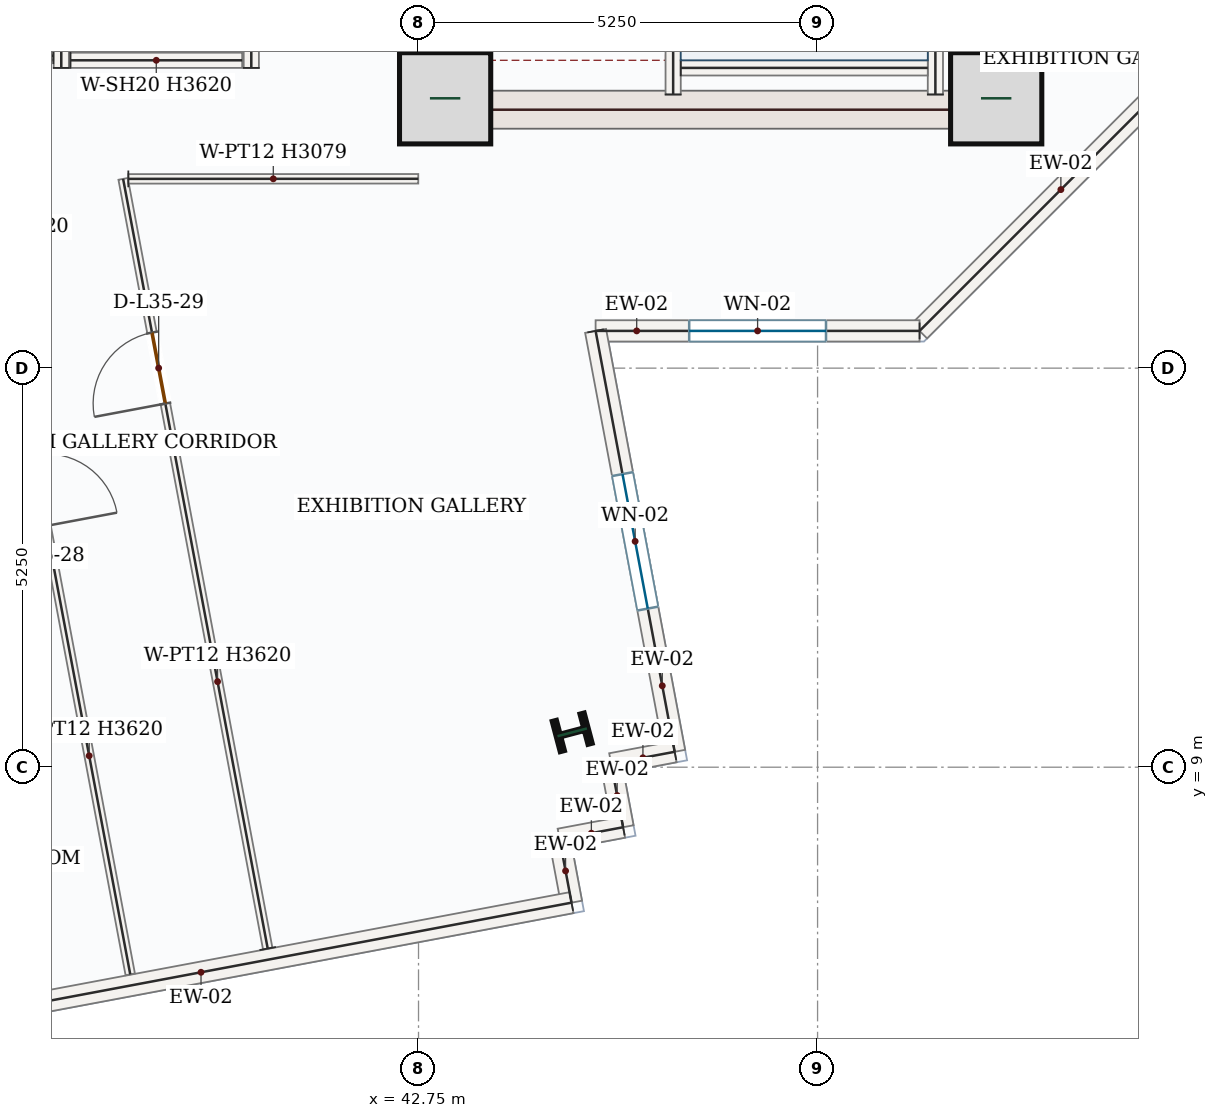
"""IFC4 building model, lengths in metres.
Left out: names, types, materials, properties, quantities, classifications, styles, units other than length and angle.
Written with IfcOpenShell. Run it as: python <this file> out.ifc"""

import sys

from ifc_helpers import new_model, si_unit, direction, frame, frame_2d, origin, origin_2d, place, context, subcontext, project, spatial, rectangle, i_section, extrude, source, transform, mapped, element, fill, save


model = new_model("IFC4")
c1 = context("Model", 3, precision=1e-05, world=origin(), true_north=direction((0.0, 1.0)))
c2 = subcontext(c1, "Body", "Model", "MODEL_VIEW")
j1 = project(units=[si_unit("LENGTHUNIT", "METRE"), si_unit("PLANEANGLEUNIT", "RADIAN")], contexts=[c1])
p1 = place(None, origin())
s1 = spatial("IfcSite", under=j1, at=p1, CompositionType="ELEMENT")
p2 = place(p1, origin())
s2 = spatial("IfcBuilding", under=s1, at=p2, CompositionType="ELEMENT")
p3 = place(p2, frame((0.0, 0.0, 155.1)))
s3 = spatial("IfcBuildingStorey", under=s2, at=p3, CompositionType="ELEMENT", Elevation=155.1)
p4 = place(p3, frame((43.0, 17.4, 0.0), z_axis=(0.0, 0.0, 1.0), x_axis=(0.0, 1.0, 0.0)))
e1 = element("IfcWall", 1, at=p4, inside=s3, PredefinedType="SHEAR", context=c2, shape_type="SweptSolid", body=[
    extrude(rectangle(XDim=8.55, YDim=0.5, at=frame_2d((4.275, 0.0))), origin(), (0.0, 0.0, 1.0), 3.62),
])
p5 = place(p4, frame((6.65, 0.0, 0.0)))
e2 = element("IfcOpeningElement", 2, at=p5, cuts=e1, PredefinedType="OPENING", context=c2, shape_type="SweptSolid", body=[
    extrude(rectangle(XDim=1.1, YDim=2.2, at=frame_2d((0.55, 1.1))), frame((0.0, 0.26, 0.0), z_axis=(0.0, -1.0, 0.0), x_axis=(1.0, 0.0, 0.0)), (0.0, 0.0, 1.0), 0.52),
])
p6 = place(p4, frame((1.75, 0.0, 0.0)))
e3 = element("IfcOpeningElement", 3, at=p6, cuts=e1, PredefinedType="OPENING", context=c2, shape_type="SweptSolid", body=[
    extrude(rectangle(XDim=1.3, YDim=2.2, at=frame_2d((0.65, 1.1))), frame((0.0, 0.26, 0.0), z_axis=(0.0, -1.0, 0.0), x_axis=(1.0, 0.0, 0.0)), (0.0, 0.0, 1.0), 0.52),
])
p7 = place(p4, frame((4.55, 0.0, 0.0)))
e4 = element("IfcOpeningElement", 4, at=p7, cuts=e1, PredefinedType="OPENING", context=c2, shape_type="SweptSolid", body=[
    extrude(rectangle(XDim=0.88, YDim=2.1, at=frame_2d((0.44, 1.05))), frame((0.0, 0.26, 0.0), z_axis=(0.0, -1.0, 0.0), x_axis=(1.0, 0.0, 0.0)), (0.0, 0.0, 1.0), 0.52),
])
m1 = source(origin(), c2, "Body", "SweptSolid", [
    extrude(rectangle(XDim=8.55, YDim=0.5, at=frame_2d((4.275, 0.0))), origin(), (0.0, 0.0, 1.0), 3.62),
])
p8 = place(p3, frame((50.5, 17.4, 0.0), z_axis=(0.0, 0.0, 1.0), x_axis=(0.0, 1.0, 0.0)))
e5 = element("IfcWall", 5, at=p8, inside=s3, PredefinedType="SHEAR", context=c2, shape_type="MappedRepresentation", body=[
    mapped(m1, transform((0.0, 0.0, 0.0), x_axis=(1.0, 0.0, 0.0), y_axis=(0.0, 1.0, 0.0), z_axis=(0.0, 0.0, 1.0), scale=1.0)),
])
m2 = source(origin(), c2, "Body", "SweptSolid", [
    extrude(rectangle(XDim=7.0, YDim=0.5, at=frame_2d((3.5, 0.0))), origin(), (0.0, 0.0, 1.0), 3.62),
])
p9 = place(p3, frame((43.25, 17.65, 0.0), z_axis=(0.0, 0.0, 1.0), x_axis=(1.0, 0.0, 0.0)))
e6 = element("IfcWall", 6, at=p9, inside=s3, PredefinedType="SHEAR", context=c2, shape_type="MappedRepresentation", body=[
    mapped(m2, transform((0.0, 0.0, 0.0), x_axis=(1.0, 0.0, 0.0), y_axis=(0.0, 1.0, 0.0), z_axis=(0.0, 0.0, 1.0), scale=1.0)),
])
m3 = source(origin(), c2, "Body", "SweptSolid", [
    extrude(rectangle(XDim=1.2, YDim=1.2, at=origin_2d()), origin(), (0.0, 0.0, 1.0), 3.9),
])
for number, where, z_axis, x_axis in (
    (7, (43.1, 17.8, 0.0), (0.0, 0.0, 1.0), (1.0, 0.0, 0.0)),
    (8, (50.35, 17.8, 0.0), (0.0, 0.0, 1.0), (1.0, 0.0, 0.0)),
):
    element("IfcColumn", number, at=place(p3, frame(where, z_axis=z_axis, x_axis=x_axis)), inside=s3, PredefinedType="COLUMN", context=c2, shape_type="MappedRepresentation", body=[
        mapped(m3, transform((0.0, 0.0, 0.0), x_axis=(1.0, 0.0, 0.0), y_axis=(0.0, 1.0, 0.0), z_axis=(0.0, 0.0, 1.0), scale=1.0)),
    ])
m4 = source(origin(), c2, "Body", "SweptSolid", [
    extrude(i_section(OverallWidth=0.412, OverallDepth=0.435, WebThickness=0.036, FlangeThickness=0.057, FilletRadius=0.018, at=origin_2d()), origin(), (0.0, 0.0, 1.0), 3.9),
])
p10 = place(p3, frame((44.772, 9.459, 0.0), z_axis=(0.0, 0.0, 1.0), x_axis=(-0.255445757936, 0.966823388604, 0.0)))
e9 = element("IfcColumn", 9, at=p10, inside=s3, PredefinedType="COLUMN", context=c2, shape_type="MappedRepresentation", body=[
    mapped(m4, transform((0.0, 0.0, 0.0), x_axis=(1.0, 0.0, 0.0), y_axis=(0.0, 1.0, 0.0), z_axis=(0.0, 0.0, 1.0), scale=1.0)),
])
m5 = source(origin(), c2, "Body", "SweptSolid", [
    extrude(rectangle(XDim=5.258, YDim=0.28, at=frame_2d((2.629, 0.0))), origin(), (0.0, 0.0, 1.0), 3.62),
])
p11 = place(p3, frame((53.06, 18.458, 0.0), z_axis=(0.0, 0.0, 1.0), x_axis=(-0.707106781187, -0.707106781187, 0.0)))
e10 = element("IfcWall", 10, at=p11, inside=s3, PredefinedType="SOLIDWALL", context=c2, shape_type="MappedRepresentation", body=[
    mapped(m5, transform((0.0, 0.0, 0.0), x_axis=(1.0, 0.0, 0.0), y_axis=(0.0, 1.0, 0.0), z_axis=(0.0, 0.0, 1.0), scale=1.0)),
])
p12 = place(p3, frame((49.342, 14.74, 0.0), z_axis=(0.0, 0.0, 1.0), x_axis=(-1.0, 0.0, 0.0)))
e11 = element("IfcWall", 11, at=p12, inside=s3, PredefinedType="SOLIDWALL", context=c2, shape_type="SweptSolid", body=[
    extrude(rectangle(XDim=4.262, YDim=0.28, at=frame_2d((2.131, 0.0))), origin(), (0.0, 0.0, 1.0), 3.62),
])
p13 = place(p12, frame((1.231, 0.0, 0.85)))
e12 = element("IfcOpeningElement", 12, at=p13, cuts=e11, PredefinedType="OPENING", context=c2, shape_type="SweptSolid", body=[
    extrude(rectangle(XDim=1.8, YDim=1.75, at=frame_2d((0.9, 0.875))), frame((0.0, 0.15, 0.0), z_axis=(0.0, -1.0, 0.0), x_axis=(1.0, 0.0, 0.0)), (0.0, 0.0, 1.0), 0.3),
])
p14 = place(p3, frame((45.08, 14.74, 0.0), z_axis=(0.0, 0.0, 1.0), x_axis=(0.184678339457, -0.982799018587, 0.0)))
e13 = element("IfcWall", 13, at=p14, inside=s3, PredefinedType="SOLIDWALL", context=c2, shape_type="SweptSolid", body=[
    extrude(rectangle(XDim=5.634, YDim=0.28, at=frame_2d((2.817, 0.0))), origin(), (0.0, 0.0, 1.0), 3.62),
])
p15 = place(p14, frame((1.917, 0.0, 0.85)))
e14 = element("IfcOpeningElement", 14, at=p15, cuts=e13, PredefinedType="OPENING", context=c2, shape_type="SweptSolid", body=[
    extrude(rectangle(XDim=1.8, YDim=1.75, at=frame_2d((0.9, 0.875))), frame((0.0, 0.15, 0.0), z_axis=(0.0, -1.0, 0.0), x_axis=(1.0, 0.0, 0.0)), (0.0, 0.0, 1.0), 0.3),
])
m6 = source(origin(), c2, "Body", "SweptSolid", [
    extrude(rectangle(XDim=0.85, YDim=0.28, at=frame_2d((0.425, 0.0))), origin(), (0.0, 0.0, 1.0), 3.62),
])
for number, where, z_axis, x_axis in (
    (15, (46.12, 9.203, 0.0), (0.0, 0.0, 1.0), (-0.983, -0.185, 0.0)),
    (16, (45.285, 9.046, 0.0), (0.0, 0.0, 1.0), (0.185, -0.983, 0.0)),
    (17, (45.442, 8.21, 0.0), (0.0, 0.0, 1.0), (-0.983, -0.185, 0.0)),
    (18, (44.606, 8.053, 0.0), (0.0, 0.0, 1.0), (0.185, -0.983, 0.0)),
):
    element("IfcWall", number, at=place(p3, frame(where, z_axis=z_axis, x_axis=x_axis)), inside=s3, PredefinedType="SOLIDWALL", context=c2, shape_type="MappedRepresentation", body=[
        mapped(m6, transform((0.0, 0.0, 0.0), x_axis=(1.0, 0.0, 0.0), y_axis=(0.0, 1.0, 0.0), z_axis=(0.0, 0.0, 1.0), scale=1.0)),
    ])
m7 = source(origin(), c2, "Body", "SweptSolid", [
    extrude(rectangle(XDim=9.92, YDim=0.28, at=frame_2d((4.96, 0.0))), origin(), (0.0, 0.0, 1.0), 3.62),
])
p16 = place(p3, frame((44.763, 7.218, 0.0), z_axis=(0.0, 0.0, 1.0), x_axis=(-0.982807207568, -0.184634754994, 0.0)))
e19 = element("IfcWall", 19, at=p16, inside=s3, PredefinedType="SOLIDWALL", context=c2, shape_type="MappedRepresentation", body=[
    mapped(m7, transform((0.0, 0.0, 0.0), x_axis=(1.0, 0.0, 0.0), y_axis=(0.0, 1.0, 0.0), z_axis=(0.0, 0.0, 1.0), scale=1.0)),
])
m8 = source(origin(), c2, "Body", "SweptSolid", [
    extrude(rectangle(XDim=7.87, YDim=0.2, at=frame_2d((3.935, 0.0))), origin(), (0.0, 0.0, 1.0), 3.62),
])
p17 = place(p3, frame((49.55, 17.85, 0.0), z_axis=(0.0, 0.0, 1.0), x_axis=(0.0, 1.0, 0.0)))
e20 = element("IfcWall", 20, at=p17, inside=s3, PredefinedType="SOLIDWALL", context=c2, shape_type="MappedRepresentation", body=[
    mapped(m8, transform((0.0, 0.0, 0.0), x_axis=(1.0, 0.0, 0.0), y_axis=(0.0, 1.0, 0.0), z_axis=(0.0, 0.0, 1.0), scale=1.0)),
])
p18 = place(p3, frame((46.1, 17.85, 0.0), z_axis=(0.0, 0.0, 1.0), x_axis=(0.0, 1.0, 0.0)))
e21 = element("IfcWall", 21, at=p18, inside=s3, PredefinedType="SOLIDWALL", context=c2, shape_type="SweptSolid", body=[
    extrude(rectangle(XDim=8.0, YDim=0.2, at=frame_2d((4.0, 0.0))), origin(), (0.0, 0.0, 1.0), 3.62),
])
p19 = place(p18, frame((6.3, 0.0, 0.0)))
e22 = element("IfcOpeningElement", 22, at=p19, cuts=e21, PredefinedType="OPENING", context=c2, shape_type="SweptSolid", body=[
    extrude(rectangle(XDim=1.05, YDim=2.15, at=frame_2d((0.525, 1.075))), frame((0.0, 0.11, 0.0), z_axis=(0.0, -1.0, 0.0), x_axis=(1.0, 0.0, 0.0)), (0.0, 0.0, 1.0), 0.22),
])
m9 = source(origin(), c2, "Body", "SweptSolid", [
    extrude(rectangle(XDim=3.25, YDim=0.2, at=frame_2d((1.625, 0.0))), origin(), (0.0, 0.0, 1.0), 3.62),
])
p20 = place(p3, frame((46.2, 18.2, 0.0), z_axis=(0.0, 0.0, 1.0), x_axis=(1.0, 0.0, 0.0)))
e23 = element("IfcWall", 23, at=p20, inside=s3, PredefinedType="SOLIDWALL", context=c2, shape_type="MappedRepresentation", body=[
    mapped(m9, transform((0.0, 0.0, 0.0), x_axis=(1.0, 0.0, 0.0), y_axis=(0.0, 1.0, 0.0), z_axis=(0.0, 0.0, 1.0), scale=1.0)),
])
m10 = source(origin(), c2, "Body", "SweptSolid", [
    extrude(rectangle(XDim=2.35, YDim=0.2, at=frame_2d((1.175, 0.0))), origin(), (0.0, 0.0, 1.0), 3.62),
])
p21 = place(p3, frame((38.05, 18.2, 0.0), z_axis=(0.0, 0.0, 1.0), x_axis=(0.0, 1.0, 0.0)))
e24 = element("IfcWall", 24, at=p21, inside=s3, PredefinedType="SOLIDWALL", context=c2, shape_type="MappedRepresentation", body=[
    mapped(m10, transform((0.0, 0.0, 0.0), x_axis=(1.0, 0.0, 0.0), y_axis=(0.0, 1.0, 0.0), z_axis=(0.0, 0.0, 1.0), scale=1.0)),
])
p22 = place(p3, frame((40.55, 18.2, 0.0), z_axis=(0.0, 0.0, 1.0), x_axis=(0.0, 1.0, 0.0)))
e25 = element("IfcWall", 25, at=p22, inside=s3, PredefinedType="SOLIDWALL", context=c2, shape_type="SweptSolid", body=[
    extrude(rectangle(XDim=2.35, YDim=0.2, at=frame_2d((1.175, 0.0))), origin(), (0.0, 0.0, 1.0), 3.62),
])
p23 = place(p22, frame((0.625, 0.0, 0.0)))
e26 = element("IfcOpeningElement", 26, at=p23, cuts=e25, PredefinedType="OPENING", context=c2, shape_type="SweptSolid", body=[
    extrude(rectangle(XDim=1.1, YDim=2.15, at=frame_2d((0.55, 1.075))), frame((0.0, 0.11, 0.0), z_axis=(0.0, -1.0, 0.0), x_axis=(1.0, 0.0, 0.0)), (0.0, 0.0, 1.0), 0.22),
])
m11 = source(origin(), c2, "Body", "SweptSolid", [
    extrude(rectangle(XDim=2.26, YDim=0.2, at=frame_2d((1.13, 0.0))), origin(), (0.0, 0.0, 1.0), 3.62),
])
p24 = place(p3, frame((38.17, 18.3, 0.0), z_axis=(0.0, 0.0, 1.0), x_axis=(1.0, 0.0, 0.0)))
e27 = element("IfcWall", 27, at=p24, inside=s3, PredefinedType="SOLIDWALL", context=c2, shape_type="MappedRepresentation", body=[
    mapped(m11, transform((0.0, 0.0, 0.0), x_axis=(1.0, 0.0, 0.0), y_axis=(0.0, 1.0, 0.0), z_axis=(0.0, 0.0, 1.0), scale=1.0)),
])
p25 = place(p3, frame((37.945, 18.36, 0.0), z_axis=(0.0, 0.0, 1.0), x_axis=(-1.0, 0.0, 0.0)))
e28 = element("IfcWall", 28, at=p25, inside=s3, PredefinedType="PARTITIONING", context=c2, shape_type="SweptSolid", body=[
    extrude(rectangle(XDim=3.89, YDim=0.125, at=frame_2d((1.945, 0.0))), origin(), (0.0, 0.0, 1.0), 3.62),
])
p26 = place(p25, frame((1.47, 0.0, 0.0)))
e29 = element("IfcOpeningElement", 29, at=p26, cuts=e28, PredefinedType="OPENING", context=c2, shape_type="SweptSolid", body=[
    extrude(rectangle(XDim=0.95, YDim=2.15, at=frame_2d((0.475, 1.075))), frame((0.0, 0.073, 0.0), z_axis=(0.0, -1.0, 0.0), x_axis=(1.0, 0.0, 0.0)), (0.0, 0.0, 1.0), 0.145),
])
p27 = place(p3, frame((37.361, 14.771, 0.0), z_axis=(0.0, 0.0, 1.0), x_axis=(0.18463806937, -0.982806584908, 0.0)))
e30 = element("IfcWall", 30, at=p27, inside=s3, PredefinedType="PARTITIONING", context=c2, shape_type="SweptSolid", body=[
    extrude(rectangle(XDim=8.645, YDim=0.125, at=frame_2d((4.323, 0.0))), origin(), (0.0, 0.0, 1.0), 3.62),
])
p28 = place(p27, frame((1.693, 0.0, 0.0)))
e31 = element("IfcOpeningElement", 31, at=p28, cuts=e30, PredefinedType="OPENING", context=c2, shape_type="SweptSolid", body=[
    extrude(rectangle(XDim=0.95, YDim=2.15, at=frame_2d((0.475, 1.075))), frame((0.0, 0.073, 0.0), z_axis=(0.0, -1.0, 0.0), x_axis=(1.0, 0.0, 0.0)), (0.0, 0.0, 1.0), 0.145),
])
p29 = place(p3, frame((40.766, 6.615, 0.0), z_axis=(0.0, 0.0, 1.0), x_axis=(-0.184646211839, 0.982805055163, 0.0)))
e32 = element("IfcWall", 32, at=p29, inside=s3, PredefinedType="PARTITIONING", context=c2, shape_type="SweptSolid", body=[
    extrude(rectangle(XDim=10.303, YDim=0.125, at=frame_2d((5.151, 0.0))), origin(), (0.0, 0.0, 1.0), 3.62),
])
p30 = place(p29, frame((7.295, 0.0, 0.0)))
e33 = element("IfcOpeningElement", 33, at=p30, cuts=e32, PredefinedType="OPENING", context=c2, shape_type="SweptSolid", body=[
    extrude(rectangle(XDim=0.95, YDim=2.15, at=frame_2d((0.475, 1.075))), frame((0.0, 0.073, 0.0), z_axis=(0.0, -1.0, 0.0), x_axis=(1.0, 0.0, 0.0)), (0.0, 0.0, 1.0), 0.145),
])
m12 = source(origin(), c2, "Body", "SweptSolid", [
    extrude(rectangle(XDim=3.814, YDim=0.125, at=frame_2d((1.907, 0.0))), origin(), (0.0, 0.0, 1.0), 3.079),
])
p31 = place(p3, frame((38.932, 16.74, 0.0), z_axis=(0.0, 0.0, 1.0), x_axis=(0.999999948787, 0.000320040949, 0.0)))
e34 = element("IfcWall", 34, at=p31, inside=s3, PredefinedType="PARTITIONING", context=c2, shape_type="MappedRepresentation", body=[
    mapped(m12, transform((0.0, 0.0, 0.0), x_axis=(1.0, 0.0, 0.0), y_axis=(0.0, 1.0, 0.0), z_axis=(0.0, 0.0, 1.0), scale=1.0)),
])
m13 = source(origin(), c2, "Body", "SweptSolid", [
    extrude(rectangle(XDim=1.8, YDim=1.75, at=frame_2d((0.9, 0.875))), frame((0.0, 0.03, 0.0), z_axis=(0.0, -1.0, 0.0), x_axis=(1.0, 0.0, 0.0)), (0.0, 0.0, 1.0), 0.06),
])
p32 = place(p13, origin())
e35 = element("IfcWindow", 35, at=p32, inside=s3, PartitioningType="DOUBLE_PANEL_VERTICAL", PredefinedType="WINDOW", context=c2, shape_type="MappedRepresentation", body=[
    mapped(m13, transform((0.0, 0.0, 0.0), x_axis=(1.0, 0.0, 0.0), y_axis=(0.0, 1.0, 0.0), z_axis=(0.0, 0.0, 1.0), scale=1.0)),
])
fill(e12, e35)
p33 = place(p15, origin())
e36 = element("IfcWindow", 36, at=p33, inside=s3, PartitioningType="DOUBLE_PANEL_VERTICAL", PredefinedType="WINDOW", context=c2, shape_type="MappedRepresentation", body=[
    mapped(m13, transform((0.0, 0.0, 0.0), x_axis=(1.0, 0.0, 0.0), y_axis=(0.0, 1.0, 0.0), z_axis=(0.0, 0.0, 1.0), scale=1.0)),
])
fill(e14, e36)
m14 = source(origin(), c2, "Body", "SweptSolid", [
    extrude(rectangle(XDim=0.95, YDim=2.15, at=frame_2d((0.475, 1.075))), frame((0.0, 0.025, 0.0), z_axis=(0.0, -1.0, 0.0), x_axis=(1.0, 0.0, 0.0)), (0.0, 0.0, 1.0), 0.05),
])
p34 = place(p30, origin())
e37 = element("IfcDoor", 37, at=p34, inside=s3, OperationType="SINGLE_SWING_LEFT", PredefinedType="DOOR", context=c2, shape_type="MappedRepresentation", body=[
    mapped(m14, transform((0.0, 0.0, 0.0), x_axis=(1.0, 0.0, 0.0), y_axis=(0.0, 1.0, 0.0), z_axis=(0.0, 0.0, 1.0), scale=1.0)),
])
fill(e33, e37)
save(model, sys.argv[1])
